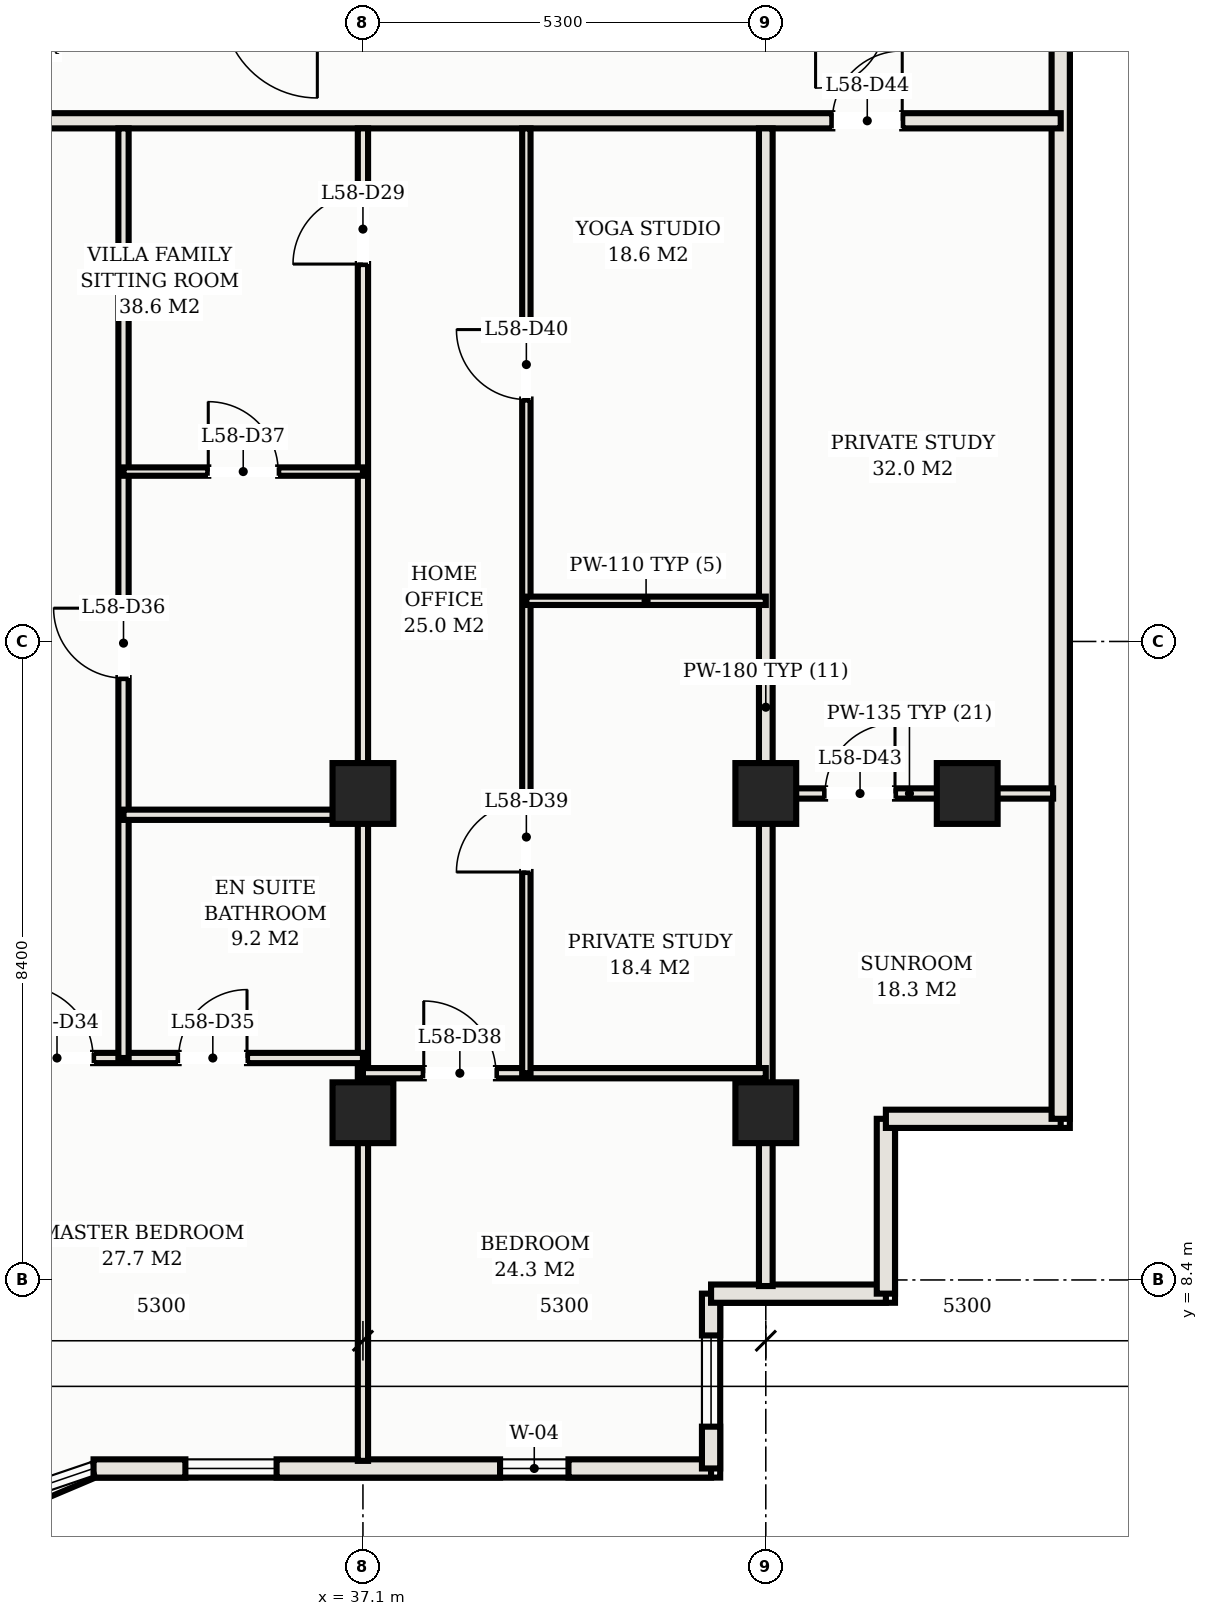
"""IFC4 building model, lengths in metres.
Left out: names, types, materials, properties, quantities, classifications, styles, units other than length and angle.
Written with IfcOpenShell. Run it as: python <this file> out.ifc"""

import sys

from ifc_helpers import new_model, si_unit, direction, frame, frame_2d, origin, origin_2d, place, context, subcontext, project, spatial, rectangle, hollow_rectangle, extrude, element, fill, save


model = new_model("IFC4")
c1 = context("Model", 3, precision=1e-05, world=origin(), true_north=direction((0.0, 1.0)))
c2 = subcontext(c1, "Body", "Model", "MODEL_VIEW")
j1 = project(units=[si_unit("LENGTHUNIT", "METRE"), si_unit("PLANEANGLEUNIT", "RADIAN")], contexts=[c1])
p1 = place(None, origin())
s1 = spatial("IfcSite", under=j1, at=p1, CompositionType="ELEMENT")
p2 = place(p1, origin())
s2 = spatial("IfcBuilding", under=s1, at=p2, CompositionType="ELEMENT")
p3 = place(p2, frame((0.0, 0.0, 213.2)))
s3 = spatial("IfcBuildingStorey", under=s2, at=p3, CompositionType="ELEMENT", Elevation=213.2)
for number, where, z_axis, x_axis in (
    (1, (37.1, 14.8, 0.0), (0.0, 0.0, 1.0), (1.0, 0.0, 0.0)),
    (2, (37.1, 10.6, 0.0), (0.0, 0.0, 1.0), (1.0, 0.0, 0.0)),
    (3, (42.4, 14.8, 0.0), (0.0, 0.0, 1.0), (1.0, 0.0, 0.0)),
    (4, (42.4, 10.6, 0.0), (0.0, 0.0, 1.0), (1.0, 0.0, 0.0)),
    (5, (45.05, 14.8, 0.0), (0.0, 0.0, 1.0), (1.0, 0.0, 0.0)),
):
    element("IfcColumn", number, at=place(p3, frame(where, z_axis=z_axis, x_axis=x_axis)), inside=s3, PredefinedType="COLUMN", context=c2, shape_type="SweptSolid", body=[
        extrude(hollow_rectangle(XDim=0.8, YDim=0.8, WallThickness=0.028, at=origin_2d()), origin(), (0.0, 0.0, 1.0), 3.3),
    ])
p4 = place(p3, frame((33.556, 5.92, 0.0), z_axis=(0.0, 0.0, 1.0), x_axis=(1.0, 0.0, 0.0)))
e6 = element("IfcWall", 6, at=p4, inside=s3, PredefinedType="SOLIDWALL", context=c2, shape_type="SweptSolid", body=[
    extrude(rectangle(XDim=8.124, YDim=0.24, at=frame_2d((4.062, 0.0))), origin(), (0.0, 0.0, 1.0), 3.11),
])
p5 = place(p4, frame((5.348, 0.0, 0.75)))
e7 = element("IfcOpeningElement", 7, at=p5, cuts=e6, PredefinedType="OPENING", context=c2, shape_type="SweptSolid", body=[
    extrude(rectangle(XDim=0.9, YDim=1.2, at=frame_2d((0.45, 0.6))), frame((0.0, 0.13, 0.0), z_axis=(0.0, -1.0, 0.0), x_axis=(1.0, 0.0, 0.0)), (0.0, 0.0, 1.0), 0.26),
])
p6 = place(p4, frame((1.208, 0.0, 0.75)))
e8 = element("IfcOpeningElement", 8, at=p6, cuts=e6, PredefinedType="OPENING", context=c2, shape_type="SweptSolid", body=[
    extrude(rectangle(XDim=1.2, YDim=1.5, at=frame_2d((0.6, 0.75))), frame((0.0, 0.13, 0.0), z_axis=(0.0, -1.0, 0.0), x_axis=(1.0, 0.0, 0.0)), (0.0, 0.0, 1.0), 0.26),
])
p7 = place(p3, frame((41.68, 5.92, 0.0), z_axis=(0.0, 0.0, 1.0), x_axis=(0.0, 1.0, 0.0)))
e9 = element("IfcWall", 9, at=p7, inside=s3, PredefinedType="SOLIDWALL", context=c2, shape_type="SweptSolid", body=[
    extrude(rectangle(XDim=2.3, YDim=0.24, at=frame_2d((1.15, 0.0))), origin(), (0.0, 0.0, 1.0), 3.11),
])
p8 = place(p7, frame((0.55, 0.0, 0.75)))
e10 = element("IfcOpeningElement", 10, at=p8, cuts=e9, PredefinedType="OPENING", context=c2, shape_type="SweptSolid", body=[
    extrude(rectangle(XDim=1.2, YDim=1.5, at=frame_2d((0.6, 0.75))), frame((0.0, 0.13, 0.0), z_axis=(0.0, -1.0, 0.0), x_axis=(1.0, 0.0, 0.0)), (0.0, 0.0, 1.0), 0.26),
])
for number, where, z_axis, x_axis in (
    (11, (41.68, 8.22, 0.0), (0.0, 0.0, 1.0), (1.0, 0.0, 0.0)),
    (12, (43.98, 8.22, 0.0), (0.0, 0.0, 1.0), (0.0, 1.0, 0.0)),
    (13, (43.98, 10.52, 0.0), (0.0, 0.0, 1.0), (1.0, 0.0, 0.0)),
):
    element("IfcWall", number, at=place(p3, frame(where, z_axis=z_axis, x_axis=x_axis)), inside=s3, PredefinedType="SOLIDWALL", context=c2, shape_type="SweptSolid", body=[
        extrude(rectangle(XDim=2.3, YDim=0.24, at=frame_2d((1.15, 0.0))), origin(), (0.0, 0.0, 1.0), 3.11),
    ])
p9 = place(p3, frame((46.28, 10.52, 0.0), z_axis=(0.0, 0.0, 1.0), x_axis=(0.0, 1.0, 0.0)))
e14 = element("IfcWall", 14, at=p9, inside=s3, PredefinedType="SOLIDWALL", context=c2, shape_type="SweptSolid", body=[
    extrude(rectangle(XDim=26.41, YDim=0.24, at=frame_2d((13.205, 0.0))), origin(), (0.0, 0.0, 1.0), 3.11),
])
p10 = place(p9, frame((17.48, 0.0, 0.0)))
e15 = element("IfcOpeningElement", 15, at=p10, cuts=e14, PredefinedType="OPENING", context=c2, shape_type="SweptSolid", body=[
    extrude(rectangle(XDim=1.8, YDim=2.2, at=frame_2d((0.9, 1.1))), frame((0.0, 0.13, 0.0), z_axis=(0.0, -1.0, 0.0), x_axis=(1.0, 0.0, 0.0)), (0.0, 0.0, 1.0), 0.26),
])
p11 = place(p3, frame((6.72, 23.65, 0.0), z_axis=(0.0, 0.0, 1.0), x_axis=(1.0, 0.0, 0.0)))
e16 = element("IfcWall", 16, at=p11, inside=s3, PredefinedType="PARTITIONING", context=c2, shape_type="SweptSolid", body=[
    extrude(rectangle(XDim=39.56, YDim=0.2, at=frame_2d((19.78, 0.0))), origin(), (0.0, 0.0, 1.0), 2.43),
])
p12 = place(p11, frame((4.63, 0.0, 0.0)))
e17 = element("IfcOpeningElement", 17, at=p12, cuts=e16, PredefinedType="OPENING", context=c2, shape_type="SweptSolid", body=[
    extrude(rectangle(XDim=1.1, YDim=2.25, at=frame_2d((0.55, 1.125))), frame((0.0, 0.11, 0.0), z_axis=(0.0, -1.0, 0.0), x_axis=(1.0, 0.0, 0.0)), (0.0, 0.0, 1.0), 0.22),
])
p13 = place(p11, frame((20.53, 0.0, 0.0)))
e18 = element("IfcOpeningElement", 18, at=p13, cuts=e16, PredefinedType="OPENING", context=c2, shape_type="SweptSolid", body=[
    extrude(rectangle(XDim=1.1, YDim=2.25, at=frame_2d((0.55, 1.125))), frame((0.0, 0.11, 0.0), z_axis=(0.0, -1.0, 0.0), x_axis=(1.0, 0.0, 0.0)), (0.0, 0.0, 1.0), 0.22),
])
p14 = place(p11, frame((2.085, 0.0, 0.0)))
e19 = element("IfcOpeningElement", 19, at=p14, cuts=e16, PredefinedType="OPENING", context=c2, shape_type="SweptSolid", body=[
    extrude(rectangle(XDim=0.92, YDim=2.15, at=frame_2d((0.46, 1.075))), frame((0.0, 0.11, 0.0), z_axis=(0.0, -1.0, 0.0), x_axis=(1.0, 0.0, 0.0)), (0.0, 0.0, 1.0), 0.22),
])
p15 = place(p11, frame((36.555, 0.0, 0.0)))
e20 = element("IfcOpeningElement", 20, at=p15, cuts=e16, PredefinedType="OPENING", context=c2, shape_type="SweptSolid", body=[
    extrude(rectangle(XDim=0.92, YDim=2.15, at=frame_2d((0.46, 1.075))), frame((0.0, 0.11, 0.0), z_axis=(0.0, -1.0, 0.0), x_axis=(1.0, 0.0, 0.0)), (0.0, 0.0, 1.0), 0.22),
])
p16 = place(p3, frame((42.4, 8.32, 0.0), z_axis=(0.0, 0.0, 1.0), x_axis=(0.0, 1.0, 0.0)))
e21 = element("IfcWall", 21, at=p16, inside=s3, PredefinedType="PARTITIONING", context=c2, shape_type="SweptSolid", body=[
    extrude(rectangle(XDim=15.23, YDim=0.18, at=frame_2d((7.615, 0.0))), origin(), (0.0, 0.0, 1.0), 2.43),
])
p17 = place(p3, frame((37.1, 6.02, 0.0), z_axis=(0.0, 0.0, 1.0), x_axis=(0.0, 1.0, 0.0)))
e22 = element("IfcWall", 22, at=p17, inside=s3, PredefinedType="PARTITIONING", context=c2, shape_type="SweptSolid", body=[
    extrude(rectangle(XDim=17.53, YDim=0.135, at=frame_2d((8.765, 0.0))), origin(), (0.0, 0.0, 1.0), 2.43),
])
p18 = place(p17, frame((15.745, 0.0, 0.0)))
e23 = element("IfcOpeningElement", 23, at=p18, cuts=e22, PredefinedType="OPENING", context=c2, shape_type="SweptSolid", body=[
    extrude(rectangle(XDim=0.92, YDim=2.15, at=frame_2d((0.46, 1.075))), frame((0.0, 0.078, 0.0), z_axis=(0.0, -1.0, 0.0), x_axis=(1.0, 0.0, 0.0)), (0.0, 0.0, 1.0), 0.155),
])
p19 = place(p3, frame((31.8, 11.32, 0.0), z_axis=(0.0, 0.0, 1.0), x_axis=(1.0, 0.0, 0.0)))
e24 = element("IfcWall", 24, at=p19, inside=s3, PredefinedType="PARTITIONING", context=c2, shape_type="SweptSolid", body=[
    extrude(rectangle(XDim=5.3, YDim=0.135, at=frame_2d((2.65, 0.0))), origin(), (0.0, 0.0, 1.0), 2.43),
])
p20 = place(p19, frame((0.8, 0.0, 0.0)))
e25 = element("IfcOpeningElement", 25, at=p20, cuts=e24, PredefinedType="OPENING", context=c2, shape_type="SweptSolid", body=[
    extrude(rectangle(XDim=0.95, YDim=2.15, at=frame_2d((0.475, 1.075))), frame((0.0, 0.078, 0.0), z_axis=(0.0, -1.0, 0.0), x_axis=(1.0, 0.0, 0.0)), (0.0, 0.0, 1.0), 0.155),
])
p21 = place(p19, frame((2.875, 0.0, 0.0)))
e26 = element("IfcOpeningElement", 26, at=p21, cuts=e24, PredefinedType="OPENING", context=c2, shape_type="SweptSolid", body=[
    extrude(rectangle(XDim=0.9, YDim=2.15, at=frame_2d((0.45, 1.075))), frame((0.0, 0.078, 0.0), z_axis=(0.0, -1.0, 0.0), x_axis=(1.0, 0.0, 0.0)), (0.0, 0.0, 1.0), 0.155),
])
p22 = place(p3, frame((33.95, 11.32, 0.0), z_axis=(0.0, 0.0, 1.0), x_axis=(0.0, 1.0, 0.0)))
e27 = element("IfcWall", 27, at=p22, inside=s3, PredefinedType="PARTITIONING", context=c2, shape_type="SweptSolid", body=[
    extrude(rectangle(XDim=12.23, YDim=0.135, at=frame_2d((6.115, 0.0))), origin(), (0.0, 0.0, 1.0), 2.43),
])
p23 = place(p22, frame((4.998, 0.0, 0.0)))
e28 = element("IfcOpeningElement", 28, at=p23, cuts=e27, PredefinedType="OPENING", context=c2, shape_type="SweptSolid", body=[
    extrude(rectangle(XDim=0.92, YDim=2.15, at=frame_2d((0.46, 1.075))), frame((0.0, 0.078, 0.0), z_axis=(0.0, -1.0, 0.0), x_axis=(1.0, 0.0, 0.0)), (0.0, 0.0, 1.0), 0.155),
])
p24 = place(p3, frame((33.95, 14.52, 0.0), z_axis=(0.0, 0.0, 1.0), x_axis=(1.0, 0.0, 0.0)))
e29 = element("IfcWall", 29, at=p24, inside=s3, PredefinedType="PARTITIONING", context=c2, shape_type="SweptSolid", body=[
    extrude(rectangle(XDim=3.15, YDim=0.135, at=frame_2d((1.575, 0.0))), origin(), (0.0, 0.0, 1.0), 2.43),
])
p25 = place(p3, frame((33.95, 19.035, 0.0), z_axis=(0.0, 0.0, 1.0), x_axis=(1.0, 0.0, 0.0)))
e30 = element("IfcWall", 30, at=p25, inside=s3, PredefinedType="MOVABLE", context=c2, shape_type="SweptSolid", body=[
    extrude(rectangle(XDim=3.15, YDim=0.11, at=frame_2d((1.575, 0.0))), origin(), (0.0, 0.0, 1.0), 2.43),
])
p26 = place(p25, frame((1.115, 0.0, 0.0)))
e31 = element("IfcOpeningElement", 31, at=p26, cuts=e30, PredefinedType="OPENING", context=c2, shape_type="SweptSolid", body=[
    extrude(rectangle(XDim=0.92, YDim=2.15, at=frame_2d((0.46, 1.075))), frame((0.0, 0.065, 0.0), z_axis=(0.0, -1.0, 0.0), x_axis=(1.0, 0.0, 0.0)), (0.0, 0.0, 1.0), 0.13),
])
p27 = place(p3, frame((37.1, 11.12, 0.0), z_axis=(0.0, 0.0, 1.0), x_axis=(1.0, 0.0, 0.0)))
e32 = element("IfcWall", 32, at=p27, inside=s3, PredefinedType="PARTITIONING", context=c2, shape_type="SweptSolid", body=[
    extrude(rectangle(XDim=5.3, YDim=0.135, at=frame_2d((2.65, 0.0))), origin(), (0.0, 0.0, 1.0), 2.43),
])
p28 = place(p27, frame((0.8, 0.0, 0.0)))
e33 = element("IfcOpeningElement", 33, at=p28, cuts=e32, PredefinedType="OPENING", context=c2, shape_type="SweptSolid", body=[
    extrude(rectangle(XDim=0.95, YDim=2.15, at=frame_2d((0.475, 1.075))), frame((0.0, 0.078, 0.0), z_axis=(0.0, -1.0, 0.0), x_axis=(1.0, 0.0, 0.0)), (0.0, 0.0, 1.0), 0.155),
])
p29 = place(p3, frame((39.25, 11.12, 0.0), z_axis=(0.0, 0.0, 1.0), x_axis=(0.0, 1.0, 0.0)))
e34 = element("IfcWall", 34, at=p29, inside=s3, PredefinedType="MOVABLE", context=c2, shape_type="SweptSolid", body=[
    extrude(rectangle(XDim=12.43, YDim=0.11, at=frame_2d((6.215, 0.0))), origin(), (0.0, 0.0, 1.0), 2.43),
])
p30 = place(p29, frame((2.647, 0.0, 0.0)))
e35 = element("IfcOpeningElement", 35, at=p30, cuts=e34, PredefinedType="OPENING", context=c2, shape_type="SweptSolid", body=[
    extrude(rectangle(XDim=0.92, YDim=2.15, at=frame_2d((0.46, 1.075))), frame((0.0, 0.065, 0.0), z_axis=(0.0, -1.0, 0.0), x_axis=(1.0, 0.0, 0.0)), (0.0, 0.0, 1.0), 0.13),
])
p31 = place(p29, frame((8.863, 0.0, 0.0)))
e36 = element("IfcOpeningElement", 36, at=p31, cuts=e34, PredefinedType="OPENING", context=c2, shape_type="SweptSolid", body=[
    extrude(rectangle(XDim=0.92, YDim=2.15, at=frame_2d((0.46, 1.075))), frame((0.0, 0.065, 0.0), z_axis=(0.0, -1.0, 0.0), x_axis=(1.0, 0.0, 0.0)), (0.0, 0.0, 1.0), 0.13),
])
p32 = place(p3, frame((39.25, 17.335, 0.0), z_axis=(0.0, 0.0, 1.0), x_axis=(1.0, 0.0, 0.0)))
e37 = element("IfcWall", 37, at=p32, inside=s3, PredefinedType="MOVABLE", context=c2, shape_type="SweptSolid", body=[
    extrude(rectangle(XDim=3.15, YDim=0.11, at=frame_2d((1.575, 0.0))), origin(), (0.0, 0.0, 1.0), 2.43),
])
p33 = place(p3, frame((42.4, 14.8, 0.0), z_axis=(0.0, 0.0, 1.0), x_axis=(1.0, 0.0, 0.0)))
e38 = element("IfcWall", 38, at=p33, inside=s3, PredefinedType="PARTITIONING", context=c2, shape_type="SweptSolid", body=[
    extrude(rectangle(XDim=3.78, YDim=0.135, at=frame_2d((1.89, 0.0))), origin(), (0.0, 0.0, 1.0), 2.43),
])
p34 = place(p33, frame((0.78, 0.0, 0.0)))
e39 = element("IfcOpeningElement", 39, at=p34, cuts=e38, PredefinedType="OPENING", context=c2, shape_type="SweptSolid", body=[
    extrude(rectangle(XDim=0.92, YDim=2.15, at=frame_2d((0.46, 1.075))), frame((0.0, 0.078, 0.0), z_axis=(0.0, -1.0, 0.0), x_axis=(1.0, 0.0, 0.0)), (0.0, 0.0, 1.0), 0.155),
])
p35 = place(p5, origin())
e40 = element("IfcWindow", 40, at=p35, inside=s3, PartitioningType="SINGLE_PANEL", PredefinedType="WINDOW", context=c2, shape_type="SweptSolid", body=[
    extrude(rectangle(XDim=0.9, YDim=1.2, at=frame_2d((0.45, 0.6))), frame((0.0, 0.03, 0.0), z_axis=(0.0, -1.0, 0.0), x_axis=(1.0, 0.0, 0.0)), (0.0, 0.0, 1.0), 0.06),
])
fill(e7, e40)
p36 = place(p8, origin())
e41 = element("IfcWindow", 41, at=p36, inside=s3, PartitioningType="SINGLE_PANEL", PredefinedType="WINDOW", context=c2, shape_type="SweptSolid", body=[
    extrude(rectangle(XDim=1.2, YDim=1.5, at=frame_2d((0.6, 0.75))), frame((0.0, 0.03, 0.0), z_axis=(0.0, -1.0, 0.0), x_axis=(1.0, 0.0, 0.0)), (0.0, 0.0, 1.0), 0.06),
])
fill(e10, e41)
p37 = place(p18, origin())
e42 = element("IfcDoor", 42, at=p37, inside=s3, OperationType="SINGLE_SWING_LEFT", PredefinedType="DOOR", context=c2, shape_type="SweptSolid", body=[
    extrude(rectangle(XDim=0.92, YDim=2.15, at=frame_2d((0.46, 1.075))), frame((0.0, 0.025, 0.0), z_axis=(0.0, -1.0, 0.0), x_axis=(1.0, 0.0, 0.0)), (0.0, 0.0, 1.0), 0.05),
])
fill(e23, e42)
p38 = place(p20, origin())
e43 = element("IfcDoor", 43, at=p38, inside=s3, OperationType="SINGLE_SWING_LEFT", PredefinedType="DOOR", context=c2, shape_type="SweptSolid", body=[
    extrude(rectangle(XDim=0.95, YDim=2.15, at=frame_2d((0.475, 1.075))), frame((0.0, 0.025, 0.0), z_axis=(0.0, -1.0, 0.0), x_axis=(1.0, 0.0, 0.0)), (0.0, 0.0, 1.0), 0.05),
])
fill(e25, e43)
p39 = place(p21, origin())
e44 = element("IfcDoor", 44, at=p39, inside=s3, OperationType="SINGLE_SWING_RIGHT", PredefinedType="DOOR", context=c2, shape_type="SweptSolid", body=[
    extrude(rectangle(XDim=0.9, YDim=2.15, at=frame_2d((0.45, 1.075))), frame((0.0, 0.025, 0.0), z_axis=(0.0, -1.0, 0.0), x_axis=(1.0, 0.0, 0.0)), (0.0, 0.0, 1.0), 0.05),
])
fill(e26, e44)
p40 = place(p23, origin())
e45 = element("IfcDoor", 45, at=p40, inside=s3, OperationType="SINGLE_SWING_RIGHT", PredefinedType="DOOR", context=c2, shape_type="SweptSolid", body=[
    extrude(rectangle(XDim=0.92, YDim=2.15, at=frame_2d((0.46, 1.075))), frame((0.0, 0.025, 0.0), z_axis=(0.0, -1.0, 0.0), x_axis=(1.0, 0.0, 0.0)), (0.0, 0.0, 1.0), 0.05),
])
fill(e28, e45)
p41 = place(p26, origin())
e46 = element("IfcDoor", 46, at=p41, inside=s3, OperationType="SINGLE_SWING_LEFT", PredefinedType="DOOR", context=c2, shape_type="SweptSolid", body=[
    extrude(rectangle(XDim=0.92, YDim=2.15, at=frame_2d((0.46, 1.075))), frame((0.0, 0.025, 0.0), z_axis=(0.0, -1.0, 0.0), x_axis=(1.0, 0.0, 0.0)), (0.0, 0.0, 1.0), 0.05),
])
fill(e31, e46)
p42 = place(p28, origin())
e47 = element("IfcDoor", 47, at=p42, inside=s3, OperationType="SINGLE_SWING_LEFT", PredefinedType="DOOR", context=c2, shape_type="SweptSolid", body=[
    extrude(rectangle(XDim=0.95, YDim=2.15, at=frame_2d((0.475, 1.075))), frame((0.0, 0.025, 0.0), z_axis=(0.0, -1.0, 0.0), x_axis=(1.0, 0.0, 0.0)), (0.0, 0.0, 1.0), 0.05),
])
fill(e33, e47)
p43 = place(p30, origin())
e48 = element("IfcDoor", 48, at=p43, inside=s3, OperationType="SINGLE_SWING_LEFT", PredefinedType="DOOR", context=c2, shape_type="SweptSolid", body=[
    extrude(rectangle(XDim=0.92, YDim=2.15, at=frame_2d((0.46, 1.075))), frame((0.0, 0.025, 0.0), z_axis=(0.0, -1.0, 0.0), x_axis=(1.0, 0.0, 0.0)), (0.0, 0.0, 1.0), 0.05),
])
fill(e35, e48)
p44 = place(p31, origin())
e49 = element("IfcDoor", 49, at=p44, inside=s3, OperationType="SINGLE_SWING_RIGHT", PredefinedType="DOOR", context=c2, shape_type="SweptSolid", body=[
    extrude(rectangle(XDim=0.92, YDim=2.15, at=frame_2d((0.46, 1.075))), frame((0.0, 0.025, 0.0), z_axis=(0.0, -1.0, 0.0), x_axis=(1.0, 0.0, 0.0)), (0.0, 0.0, 1.0), 0.05),
])
fill(e36, e49)
p45 = place(p34, origin())
e50 = element("IfcDoor", 50, at=p45, inside=s3, OperationType="SINGLE_SWING_RIGHT", PredefinedType="DOOR", context=c2, shape_type="SweptSolid", body=[
    extrude(rectangle(XDim=0.92, YDim=2.15, at=frame_2d((0.46, 1.075))), frame((0.0, 0.025, 0.0), z_axis=(0.0, -1.0, 0.0), x_axis=(1.0, 0.0, 0.0)), (0.0, 0.0, 1.0), 0.05),
])
fill(e39, e50)
p46 = place(p15, origin())
e51 = element("IfcDoor", 51, at=p46, inside=s3, OperationType="SINGLE_SWING_RIGHT", PredefinedType="DOOR", context=c2, shape_type="SweptSolid", body=[
    extrude(rectangle(XDim=0.92, YDim=2.15, at=frame_2d((0.46, 1.075))), frame((0.0, 0.025, 0.0), z_axis=(0.0, -1.0, 0.0), x_axis=(1.0, 0.0, 0.0)), (0.0, 0.0, 1.0), 0.05),
])
fill(e20, e51)
p47 = place(p6, origin())
e52 = element("IfcWindow", 52, at=p47, inside=s3, PartitioningType="SINGLE_PANEL", PredefinedType="WINDOW", context=c2, shape_type="SweptSolid", body=[
    extrude(rectangle(XDim=1.2, YDim=1.5, at=frame_2d((0.6, 0.75))), frame((0.0, 0.03, 0.0), z_axis=(0.0, -1.0, 0.0), x_axis=(1.0, 0.0, 0.0)), (0.0, 0.0, 1.0), 0.06),
])
fill(e8, e52)
save(model, sys.argv[1])
